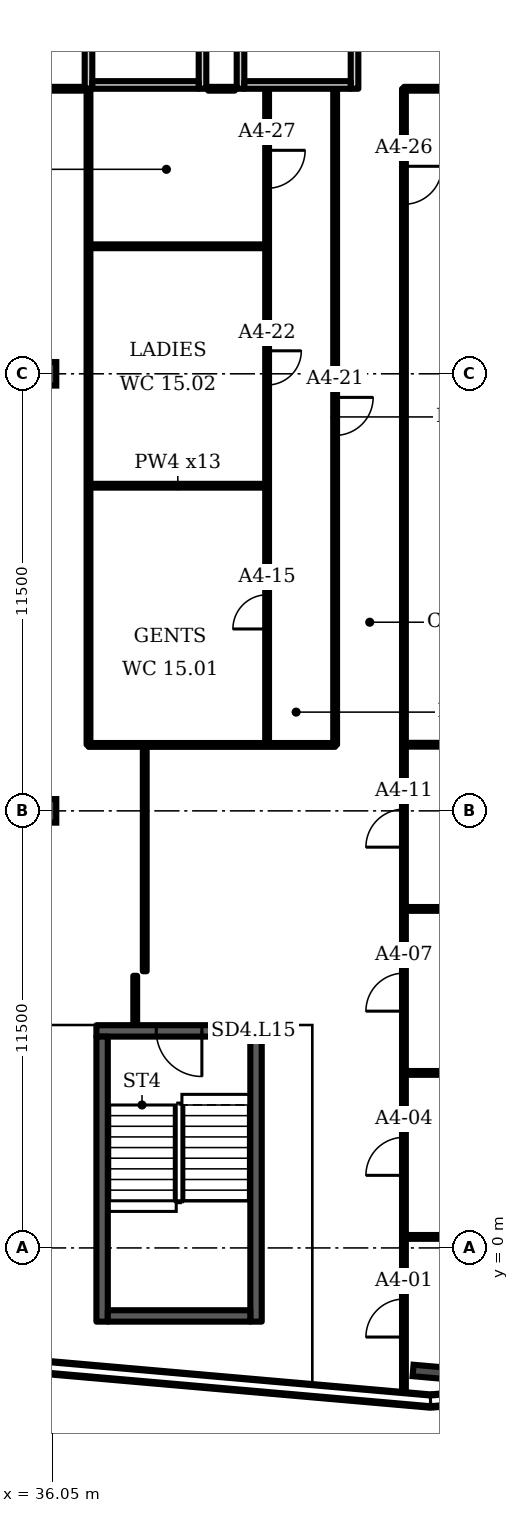
"""IFC4 building model, lengths in metres.
Left out: names, types, materials, properties, quantities, classifications, styles, units other than length and angle.
Written with IfcOpenShell. Run it as: python <this file> out.ifc"""

import sys

from ifc_helpers import new_model, si_unit, direction, frame, frame_2d, origin, origin_2d, place, context, subcontext, project, spatial, rectangle, i_section, extrude, element, fill, save


model = new_model("IFC4")
c1 = context("Model", 3, precision=1e-05, world=origin(), true_north=direction((0.0, 1.0)))
c2 = subcontext(c1, "Body", "Model", "MODEL_VIEW")
j1 = project(units=[si_unit("LENGTHUNIT", "METRE"), si_unit("PLANEANGLEUNIT", "RADIAN")], contexts=[c1])
p1 = place(None, origin())
s1 = spatial("IfcSite", under=j1, at=p1, CompositionType="ELEMENT")
p2 = place(p1, origin())
s2 = spatial("IfcBuilding", under=s1, at=p2, CompositionType="ELEMENT")
p3 = place(p2, frame((0.0, 0.0, 73.9)))
s3 = spatial("IfcBuildingStorey", under=s2, at=p3, CompositionType="ELEMENT", Elevation=73.9)
p4 = place(p3, frame((46.042, -3.268, 0.0), z_axis=(0.0, 0.0, 1.0), x_axis=(-0.087156, -0.996198, 0.0)))
e1 = element("IfcColumn", 1, at=p4, inside=s3, PredefinedType="COLUMN", context=c2, shape_type="SweptSolid", body=[
    extrude(i_section(OverallWidth=0.302, OverallDepth=1.008, WebThickness=0.021, FlangeThickness=0.04, FilletRadius=0.03, at=origin_2d()), origin(), (0.0, 0.0, 1.0), 3.6),
])
for number, where, z_axis, x_axis in (
    (2, (36.0, 11.5, 0.0), (0.0, 0.0, 1.0), (1.0, 0.0, 0.0)),
    (3, (36.0, 23.0, 0.0), (0.0, 0.0, 1.0), (1.0, 0.0, 0.0)),
):
    element("IfcColumn", number, at=place(p3, frame(where, z_axis=z_axis, x_axis=x_axis)), inside=s3, PredefinedType="COLUMN", context=c2, shape_type="SweptSolid", body=[
        extrude(i_section(OverallWidth=0.305, OverallDepth=0.62, WebThickness=0.021, FlangeThickness=0.04, FilletRadius=0.027, at=origin_2d()), origin(), (0.0, 0.0, 1.0), 3.6),
    ])
p5 = place(p3, frame((34.601, -3.032, 0.0), z_axis=(0.0, 0.0, 1.0), x_axis=(0.996193, -0.087148, 0.0)))
e4 = element("IfcWall", 4, at=p5, inside=s3, PredefinedType="SOLIDWALL", context=c2, shape_type="SweptSolid", body=[
    extrude(rectangle(XDim=11.458, YDim=0.35, at=frame_2d((5.729, 0.0))), origin(), (0.0, 0.0, 1.0), 1.0),
])
p6 = place(p3, frame((46.045, -4.026, 0.0), z_axis=(0.0, 0.0, 1.0), x_axis=(0.99619, 0.087163, 0.0)))
e5 = element("IfcWall", 5, at=p6, inside=s3, PredefinedType="SOLIDWALL", context=c2, shape_type="SweptSolid", body=[
    extrude(rectangle(XDim=23.013, YDim=0.35, at=frame_2d((11.506, 0.0))), origin(), (0.0, 0.0, 1.0), 1.0),
])
p7 = place(p3, frame((37.0, 30.5, 0.0), z_axis=(0.0, 0.0, 1.0), x_axis=(0.0, 1.0, 0.0)))
e6 = element("IfcWall", 6, at=p7, inside=s3, PredefinedType="PARTITIONING", context=c2, shape_type="SweptSolid", body=[
    extrude(rectangle(XDim=3.5, YDim=0.2, at=frame_2d((1.75, 0.0))), origin(), (0.0, 0.0, 1.0), 3.2),
])
p8 = place(p7, frame((1.2, 0.0, 0.0)))
e7 = element("IfcOpeningElement", 7, at=p8, cuts=e6, PredefinedType="OPENING", context=c2, shape_type="SweptSolid", body=[
    extrude(rectangle(XDim=1.1, YDim=2.1, at=frame_2d((0.55, 1.05))), frame((0.0, 0.11, 0.0), z_axis=(0.0, -1.0, 0.0), x_axis=(1.0, 0.0, 0.0)), (0.0, 0.0, 1.0), 0.22),
])
p9 = place(p3, frame((40.0, 30.5, 0.0), z_axis=(0.0, 0.0, 1.0), x_axis=(0.0, 1.0, 0.0)))
e8 = element("IfcWall", 8, at=p9, inside=s3, PredefinedType="PARTITIONING", context=c2, shape_type="SweptSolid", body=[
    extrude(rectangle(XDim=3.5, YDim=0.2, at=frame_2d((1.75, 0.0))), origin(), (0.0, 0.0, 1.0), 3.2),
])
p10 = place(p3, frame((37.1, 30.6, 0.0), z_axis=(0.0, 0.0, 1.0), x_axis=(1.0, 0.0, 0.0)))
e9 = element("IfcWall", 9, at=p10, inside=s3, PredefinedType="PARTITIONING", context=c2, shape_type="SweptSolid", body=[
    extrude(rectangle(XDim=2.8, YDim=0.2, at=frame_2d((1.4, 0.0))), origin(), (0.0, 0.0, 1.0), 3.2),
])
p11 = place(p3, frame((41.0, 30.5, 0.0), z_axis=(0.0, 0.0, 1.0), x_axis=(0.0, 1.0, 0.0)))
e10 = element("IfcWall", 10, at=p11, inside=s3, PredefinedType="PARTITIONING", context=c2, shape_type="SweptSolid", body=[
    extrude(rectangle(XDim=3.5, YDim=0.2, at=frame_2d((1.75, 0.0))), origin(), (0.0, 0.0, 1.0), 3.2),
])
p12 = place(p3, frame((44.0, 30.5, 0.0), z_axis=(0.0, 0.0, 1.0), x_axis=(0.0, 1.0, 0.0)))
e11 = element("IfcWall", 11, at=p12, inside=s3, PredefinedType="PARTITIONING", context=c2, shape_type="SweptSolid", body=[
    extrude(rectangle(XDim=3.5, YDim=0.2, at=frame_2d((1.75, 0.0))), origin(), (0.0, 0.0, 1.0), 3.2),
])
p13 = place(p12, frame((1.2, 0.0, 0.0)))
e12 = element("IfcOpeningElement", 12, at=p13, cuts=e11, PredefinedType="OPENING", context=c2, shape_type="SweptSolid", body=[
    extrude(rectangle(XDim=1.1, YDim=2.1, at=frame_2d((0.55, 1.05))), frame((0.0, 0.11, 0.0), z_axis=(0.0, -1.0, 0.0), x_axis=(1.0, 0.0, 0.0)), (0.0, 0.0, 1.0), 0.22),
])
p14 = place(p3, frame((41.1, 30.6, 0.0), z_axis=(0.0, 0.0, 1.0), x_axis=(1.0, 0.0, 0.0)))
e13 = element("IfcWall", 13, at=p14, inside=s3, PredefinedType="PARTITIONING", context=c2, shape_type="SweptSolid", body=[
    extrude(rectangle(XDim=2.8, YDim=0.2, at=frame_2d((1.4, 0.0))), origin(), (0.0, 0.0, 1.0), 3.2),
])
p15 = place(p3, frame((37.208, 5.711, 0.0), z_axis=(0.0, 0.0, 1.0), x_axis=(1.0, 0.0, 0.0)))
e14 = element("IfcWall", 14, at=p15, inside=s3, PredefinedType="SHEAR", context=c2, shape_type="SweptSolid", body=[
    extrude(rectangle(XDim=4.35, YDim=0.3, at=frame_2d((2.175, 0.0))), origin(), (0.0, 0.0, 1.0), 3.2),
])
p16 = place(p15, frame((1.575, 0.0, 0.0)))
e15 = element("IfcOpeningElement", 15, at=p16, cuts=e14, PredefinedType="OPENING", context=c2, shape_type="SweptSolid", body=[
    extrude(rectangle(XDim=1.2, YDim=2.1, at=frame_2d((0.6, 1.05))), frame((0.0, 0.16, 0.0), z_axis=(0.0, -1.0, 0.0), x_axis=(1.0, 0.0, 0.0)), (0.0, 0.0, 1.0), 0.32),
])
p17 = place(p3, frame((21.94, 30.5, 0.0), z_axis=(0.0, 0.0, 1.0), x_axis=(1.0, 0.0, 0.0)))
e16 = element("IfcWall", 16, at=p17, inside=s3, PredefinedType="PARTITIONING", context=c2, shape_type="SweptSolid", body=[
    extrude(rectangle(XDim=14.91, YDim=0.1, at=frame_2d((7.455, 0.0))), origin(), (0.0, 0.0, 1.0), 3.2),
])
p18 = place(p17, frame((0.345, 0.0, 0.0)))
e17 = element("IfcOpeningElement", 17, at=p18, cuts=e16, PredefinedType="OPENING", context=c2, shape_type="SweptSolid", body=[
    extrude(rectangle(XDim=1.0, YDim=2.1, at=frame_2d((0.5, 1.05))), frame((0.0, 0.06, 0.0), z_axis=(0.0, -1.0, 0.0), x_axis=(1.0, 0.0, 0.0)), (0.0, 0.0, 1.0), 0.12),
])
p19 = place(p17, frame((8.95, 0.0, 0.0)))
e18 = element("IfcOpeningElement", 18, at=p19, cuts=e16, PredefinedType="OPENING", context=c2, shape_type="SweptSolid", body=[
    extrude(rectangle(XDim=1.8, YDim=2.1, at=frame_2d((0.9, 1.05))), frame((0.0, 0.06, 0.0), z_axis=(0.0, -1.0, 0.0), x_axis=(1.0, 0.0, 0.0)), (0.0, 0.0, 1.0), 0.12),
])
p20 = place(p3, frame((37.0, 13.235, 0.0), z_axis=(0.0, 0.0, 1.0), x_axis=(1.0, 0.0, 0.0)))
e19 = element("IfcWall", 19, at=p20, inside=s3, PredefinedType="PARTITIONING", context=c2, shape_type="SweptSolid", body=[
    extrude(rectangle(XDim=6.49, YDim=0.1, at=frame_2d((3.245, 0.0))), origin(), (0.0, 0.0, 1.0), 3.2),
])
p21 = place(p3, frame((37.0, 13.24, 0.0), z_axis=(0.0, 0.0, 1.0), x_axis=(0.0, 1.0, 0.0)))
e20 = element("IfcWall", 20, at=p21, inside=s3, PredefinedType="PARTITIONING", context=c2, shape_type="SweptSolid", body=[
    extrude(rectangle(XDim=17.26, YDim=0.1, at=frame_2d((8.63, 0.0))), origin(), (0.0, 0.0, 1.0), 3.2),
])
for number, where, z_axis, x_axis in (
    (21, (37.0, 20.055, 0.0), (0.0, 0.0, 1.0), (1.0, 0.0, 0.0)),
    (22, (37.0, 26.355, 0.0), (0.0, 0.0, 1.0), (1.0, 0.0, 0.0)),
):
    element("IfcWall", number, at=place(p3, frame(where, z_axis=z_axis, x_axis=x_axis)), inside=s3, PredefinedType="PARTITIONING", context=c2, shape_type="SweptSolid", body=[
        extrude(rectangle(XDim=4.7, YDim=0.1, at=frame_2d((2.35, 0.0))), origin(), (0.0, 0.0, 1.0), 3.2),
    ])
p22 = place(p3, frame((38.23, 5.881, 0.0), z_axis=(0.0, 0.0, 1.0), x_axis=(0.0, 1.0, 0.0)))
e23 = element("IfcWall", 23, at=p22, inside=s3, PredefinedType="PARTITIONING", context=c2, shape_type="SweptSolid", body=[
    extrude(rectangle(XDim=1.279, YDim=0.1, at=frame_2d((0.64, 0.0))), origin(), (0.0, 0.0, 1.0), 3.2),
])
p23 = place(p3, frame((38.48, 7.28, 0.0), z_axis=(0.0, 0.0, 1.0), x_axis=(0.0, 1.0, 0.0)))
e24 = element("IfcWall", 24, at=p23, inside=s3, PredefinedType="PARTITIONING", context=c2, shape_type="SweptSolid", body=[
    extrude(rectangle(XDim=5.955, YDim=0.1, at=frame_2d((2.978, 0.0))), origin(), (0.0, 0.0, 1.0), 3.2),
])
p24 = place(p3, frame((41.7, 13.24, 0.0), z_axis=(0.0, 0.0, 1.0), x_axis=(0.0, 1.0, 0.0)))
e25 = element("IfcWall", 25, at=p24, inside=s3, PredefinedType="PARTITIONING", context=c2, shape_type="SweptSolid", body=[
    extrude(rectangle(XDim=17.25, YDim=0.1, at=frame_2d((8.625, 0.0))), origin(), (0.0, 0.0, 1.0), 3.2),
])
p25 = place(p24, frame((3.046, 0.0, 0.0)))
e26 = element("IfcOpeningElement", 26, at=p25, cuts=e25, PredefinedType="OPENING", context=c2, shape_type="SweptSolid", body=[
    extrude(rectangle(XDim=0.9, YDim=2.1, at=frame_2d((0.45, 1.05))), frame((0.0, 0.06, 0.0), z_axis=(0.0, -1.0, 0.0), x_axis=(1.0, 0.0, 0.0)), (0.0, 0.0, 1.0), 0.12),
])
p26 = place(p24, frame((9.465, 0.0, 0.0)))
e27 = element("IfcOpeningElement", 27, at=p26, cuts=e25, PredefinedType="OPENING", context=c2, shape_type="SweptSolid", body=[
    extrude(rectangle(XDim=0.9, YDim=2.1, at=frame_2d((0.45, 1.05))), frame((0.0, 0.06, 0.0), z_axis=(0.0, -1.0, 0.0), x_axis=(1.0, 0.0, 0.0)), (0.0, 0.0, 1.0), 0.12),
])
p27 = place(p24, frame((14.64, 0.0, 0.0)))
e28 = element("IfcOpeningElement", 28, at=p27, cuts=e25, PredefinedType="OPENING", context=c2, shape_type="SweptSolid", body=[
    extrude(rectangle(XDim=1.0, YDim=2.1, at=frame_2d((0.5, 1.05))), frame((0.0, 0.06, 0.0), z_axis=(0.0, -1.0, 0.0), x_axis=(1.0, 0.0, 0.0)), (0.0, 0.0, 1.0), 0.12),
])
p28 = place(p3, frame((43.49, 13.24, 0.0), z_axis=(0.0, 0.0, 1.0), x_axis=(0.0, 1.0, 0.0)))
e29 = element("IfcWall", 29, at=p28, inside=s3, PredefinedType="PARTITIONING", context=c2, shape_type="SweptSolid", body=[
    extrude(rectangle(XDim=17.25, YDim=0.1, at=frame_2d((8.625, 0.0))), origin(), (0.0, 0.0, 1.0), 3.2),
])
p29 = place(p28, frame((8.139, 0.0, 0.0)))
e30 = element("IfcOpeningElement", 30, at=p29, cuts=e29, PredefinedType="OPENING", context=c2, shape_type="SweptSolid", body=[
    extrude(rectangle(XDim=1.0, YDim=2.1, at=frame_2d((0.5, 1.05))), frame((0.0, 0.06, 0.0), z_axis=(0.0, -1.0, 0.0), x_axis=(1.0, 0.0, 0.0)), (0.0, 0.0, 1.0), 0.12),
])
p30 = place(p3, frame((45.3, -3.943, 0.0), z_axis=(0.0, 0.0, 1.0), x_axis=(0.0, 1.0, 0.0)))
e31 = element("IfcWall", 31, at=p30, inside=s3, PredefinedType="PARTITIONING", context=c2, shape_type="SweptSolid", body=[
    extrude(rectangle(XDim=34.443, YDim=0.1, at=frame_2d((17.222, 0.0))), origin(), (0.0, 0.0, 1.0), 2.58),
])
p31 = place(p30, frame((1.598, 0.0, 0.0)))
e32 = element("IfcOpeningElement", 32, at=p31, cuts=e31, PredefinedType="OPENING", context=c2, shape_type="SweptSolid", body=[
    extrude(rectangle(XDim=1.0, YDim=2.1, at=frame_2d((0.5, 1.05))), frame((0.0, 0.06, 0.0), z_axis=(0.0, -1.0, 0.0), x_axis=(1.0, 0.0, 0.0)), (0.0, 0.0, 1.0), 0.12),
])
p32 = place(p30, frame((5.853, 0.0, 0.0)))
e33 = element("IfcOpeningElement", 33, at=p32, cuts=e31, PredefinedType="OPENING", context=c2, shape_type="SweptSolid", body=[
    extrude(rectangle(XDim=1.0, YDim=2.1, at=frame_2d((0.5, 1.05))), frame((0.0, 0.06, 0.0), z_axis=(0.0, -1.0, 0.0), x_axis=(1.0, 0.0, 0.0)), (0.0, 0.0, 1.0), 0.12),
])
p33 = place(p30, frame((10.173, 0.0, 0.0)))
e34 = element("IfcOpeningElement", 34, at=p33, cuts=e31, PredefinedType="OPENING", context=c2, shape_type="SweptSolid", body=[
    extrude(rectangle(XDim=1.0, YDim=2.1, at=frame_2d((0.5, 1.05))), frame((0.0, 0.06, 0.0), z_axis=(0.0, -1.0, 0.0), x_axis=(1.0, 0.0, 0.0)), (0.0, 0.0, 1.0), 0.12),
])
p34 = place(p30, frame((14.488, 0.0, 0.0)))
e35 = element("IfcOpeningElement", 35, at=p34, cuts=e31, PredefinedType="OPENING", context=c2, shape_type="SweptSolid", body=[
    extrude(rectangle(XDim=1.0, YDim=2.1, at=frame_2d((0.5, 1.05))), frame((0.0, 0.06, 0.0), z_axis=(0.0, -1.0, 0.0), x_axis=(1.0, 0.0, 0.0)), (0.0, 0.0, 1.0), 0.12),
])
p35 = place(p30, frame((31.403, 0.0, 0.0)))
e36 = element("IfcOpeningElement", 36, at=p35, cuts=e31, PredefinedType="OPENING", context=c2, shape_type="SweptSolid", body=[
    extrude(rectangle(XDim=1.0, YDim=2.1, at=frame_2d((0.5, 1.05))), frame((0.0, 0.06, 0.0), z_axis=(0.0, -1.0, 0.0), x_axis=(1.0, 0.0, 0.0)), (0.0, 0.0, 1.0), 0.12),
])
for number, where, z_axis, x_axis in (
    (37, (45.3, 0.29, 0.0), (0.0, 0.0, 1.0), (1.0, 0.0, 0.0)),
    (38, (45.3, 4.605, 0.0), (0.0, 0.0, 1.0), (1.0, 0.0, 0.0)),
    (39, (45.3, 8.92, 0.0), (0.0, 0.0, 1.0), (1.0, 0.0, 0.0)),
):
    element("IfcWall", number, at=place(p3, frame(where, z_axis=z_axis, x_axis=x_axis)), inside=s3, PredefinedType="PARTITIONING", context=c2, shape_type="SweptSolid", body=[
        extrude(rectangle(XDim=17.95, YDim=0.1, at=frame_2d((8.975, 0.0))), origin(), (0.0, 0.0, 1.0), 3.2),
    ])
p36 = place(p3, frame((45.3, 13.24, 0.0), z_axis=(0.0, 0.0, 1.0), x_axis=(1.0, 0.0, 0.0)))
e40 = element("IfcWall", 40, at=p36, inside=s3, PredefinedType="PARTITIONING", context=c2, shape_type="SweptSolid", body=[
    extrude(rectangle(XDim=27.56, YDim=0.1, at=frame_2d((13.78, 0.0))), origin(), (0.0, 0.0, 1.0), 3.2),
])
p37 = place(p3, frame((45.3, 30.5, 0.0), z_axis=(0.0, 0.0, 1.0), x_axis=(1.0, 0.0, 0.0)))
e41 = element("IfcWall", 41, at=p37, inside=s3, PredefinedType="PARTITIONING", context=c2, shape_type="SweptSolid", body=[
    extrude(rectangle(XDim=19.7, YDim=0.1, at=frame_2d((9.85, 0.0))), origin(), (0.0, 0.0, 1.0), 3.2),
])
p38 = place(p3, frame((40.15, 30.5, 0.0), z_axis=(0.0, 0.0, 1.0), x_axis=(1.0, 0.0, 0.0)))
e42 = element("IfcWall", 42, at=p38, inside=s3, PredefinedType="PARTITIONING", context=c2, shape_type="SweptSolid", body=[
    extrude(rectangle(XDim=0.7, YDim=0.1, at=frame_2d((0.35, 0.0))), origin(), (0.0, 0.0, 1.0), 3.2),
])
for number, where, z_axis, x_axis in (
    (43, (37.358, -1.939, 0.0), (0.0, 0.0, 1.0), (0.0, 1.0, 0.0)),
    (44, (41.408, -1.939, 0.0), (0.0, 0.0, 1.0), (0.0, 1.0, 0.0)),
):
    element("IfcWall", number, at=place(p3, frame(where, z_axis=z_axis, x_axis=x_axis)), inside=s3, PredefinedType="SHEAR", context=c2, shape_type="SweptSolid", body=[
        extrude(rectangle(XDim=7.5, YDim=0.3, at=frame_2d((3.75, 0.0))), origin(), (0.0, 0.0, 1.0), 3.2),
    ])
p39 = place(p3, frame((37.508, -1.789, 0.0), z_axis=(0.0, 0.0, 1.0), x_axis=(1.0, 0.0, 0.0)))
e45 = element("IfcWall", 45, at=p39, inside=s3, PredefinedType="SHEAR", context=c2, shape_type="SweptSolid", body=[
    extrude(rectangle(XDim=3.75, YDim=0.3, at=frame_2d((1.875, 0.0))), origin(), (0.0, 0.0, 1.0), 3.2),
])
p40 = place(p16, origin())
e46 = element("IfcDoor", 46, at=p40, inside=s3, OperationType="SINGLE_SWING_RIGHT", PredefinedType="DOOR", context=c2, shape_type="SweptSolid", body=[
    extrude(rectangle(XDim=1.2, YDim=2.1, at=frame_2d((0.6, 1.05))), frame((0.0, 0.025, 0.0), z_axis=(0.0, -1.0, 0.0), x_axis=(1.0, 0.0, 0.0)), (0.0, 0.0, 1.0), 0.05),
])
fill(e15, e46)
p41 = place(p31, origin())
e47 = element("IfcDoor", 47, at=p41, inside=s3, OperationType="SINGLE_SWING_LEFT", PredefinedType="DOOR", context=c2, shape_type="SweptSolid", body=[
    extrude(rectangle(XDim=1.0, YDim=2.1, at=frame_2d((0.5, 1.05))), frame((0.0, 0.025, 0.0), z_axis=(0.0, -1.0, 0.0), x_axis=(1.0, 0.0, 0.0)), (0.0, 0.0, 1.0), 0.05),
])
fill(e32, e47)
p42 = place(p32, origin())
e48 = element("IfcDoor", 48, at=p42, inside=s3, OperationType="SINGLE_SWING_LEFT", PredefinedType="DOOR", context=c2, shape_type="SweptSolid", body=[
    extrude(rectangle(XDim=1.0, YDim=2.1, at=frame_2d((0.5, 1.05))), frame((0.0, 0.025, 0.0), z_axis=(0.0, -1.0, 0.0), x_axis=(1.0, 0.0, 0.0)), (0.0, 0.0, 1.0), 0.05),
])
fill(e33, e48)
p43 = place(p33, origin())
e49 = element("IfcDoor", 49, at=p43, inside=s3, OperationType="SINGLE_SWING_LEFT", PredefinedType="DOOR", context=c2, shape_type="SweptSolid", body=[
    extrude(rectangle(XDim=1.0, YDim=2.1, at=frame_2d((0.5, 1.05))), frame((0.0, 0.025, 0.0), z_axis=(0.0, -1.0, 0.0), x_axis=(1.0, 0.0, 0.0)), (0.0, 0.0, 1.0), 0.05),
])
fill(e34, e49)
p44 = place(p34, origin())
e50 = element("IfcDoor", 50, at=p44, inside=s3, OperationType="SINGLE_SWING_LEFT", PredefinedType="DOOR", context=c2, shape_type="SweptSolid", body=[
    extrude(rectangle(XDim=1.0, YDim=2.1, at=frame_2d((0.5, 1.05))), frame((0.0, 0.025, 0.0), z_axis=(0.0, -1.0, 0.0), x_axis=(1.0, 0.0, 0.0)), (0.0, 0.0, 1.0), 0.05),
])
fill(e35, e50)
p45 = place(p25, origin())
e51 = element("IfcDoor", 51, at=p45, inside=s3, OperationType="SINGLE_SWING_LEFT", PredefinedType="DOOR", context=c2, shape_type="SweptSolid", body=[
    extrude(rectangle(XDim=0.9, YDim=2.1, at=frame_2d((0.45, 1.05))), frame((0.0, 0.025, 0.0), z_axis=(0.0, -1.0, 0.0), x_axis=(1.0, 0.0, 0.0)), (0.0, 0.0, 1.0), 0.05),
])
fill(e26, e51)
p46 = place(p29, origin())
e52 = element("IfcDoor", 52, at=p46, inside=s3, OperationType="SINGLE_SWING_RIGHT", PredefinedType="DOOR", context=c2, shape_type="SweptSolid", body=[
    extrude(rectangle(XDim=1.0, YDim=2.1, at=frame_2d((0.5, 1.05))), frame((0.0, 0.025, 0.0), z_axis=(0.0, -1.0, 0.0), x_axis=(1.0, 0.0, 0.0)), (0.0, 0.0, 1.0), 0.05),
])
fill(e30, e52)
p47 = place(p26, origin())
e53 = element("IfcDoor", 53, at=p47, inside=s3, OperationType="SINGLE_SWING_RIGHT", PredefinedType="DOOR", context=c2, shape_type="SweptSolid", body=[
    extrude(rectangle(XDim=0.9, YDim=2.1, at=frame_2d((0.45, 1.05))), frame((0.0, 0.025, 0.0), z_axis=(0.0, -1.0, 0.0), x_axis=(1.0, 0.0, 0.0)), (0.0, 0.0, 1.0), 0.05),
])
fill(e27, e53)
p48 = place(p35, origin())
e54 = element("IfcDoor", 54, at=p48, inside=s3, OperationType="SINGLE_SWING_RIGHT", PredefinedType="DOOR", context=c2, shape_type="SweptSolid", body=[
    extrude(rectangle(XDim=1.0, YDim=2.1, at=frame_2d((0.5, 1.05))), frame((0.0, 0.025, 0.0), z_axis=(0.0, -1.0, 0.0), x_axis=(1.0, 0.0, 0.0)), (0.0, 0.0, 1.0), 0.05),
])
fill(e36, e54)
p49 = place(p27, origin())
e55 = element("IfcDoor", 55, at=p49, inside=s3, OperationType="SINGLE_SWING_RIGHT", PredefinedType="DOOR", context=c2, shape_type="SweptSolid", body=[
    extrude(rectangle(XDim=1.0, YDim=2.1, at=frame_2d((0.5, 1.05))), frame((0.0, 0.025, 0.0), z_axis=(0.0, -1.0, 0.0), x_axis=(1.0, 0.0, 0.0)), (0.0, 0.0, 1.0), 0.05),
])
fill(e28, e55)
save(model, sys.argv[1])
